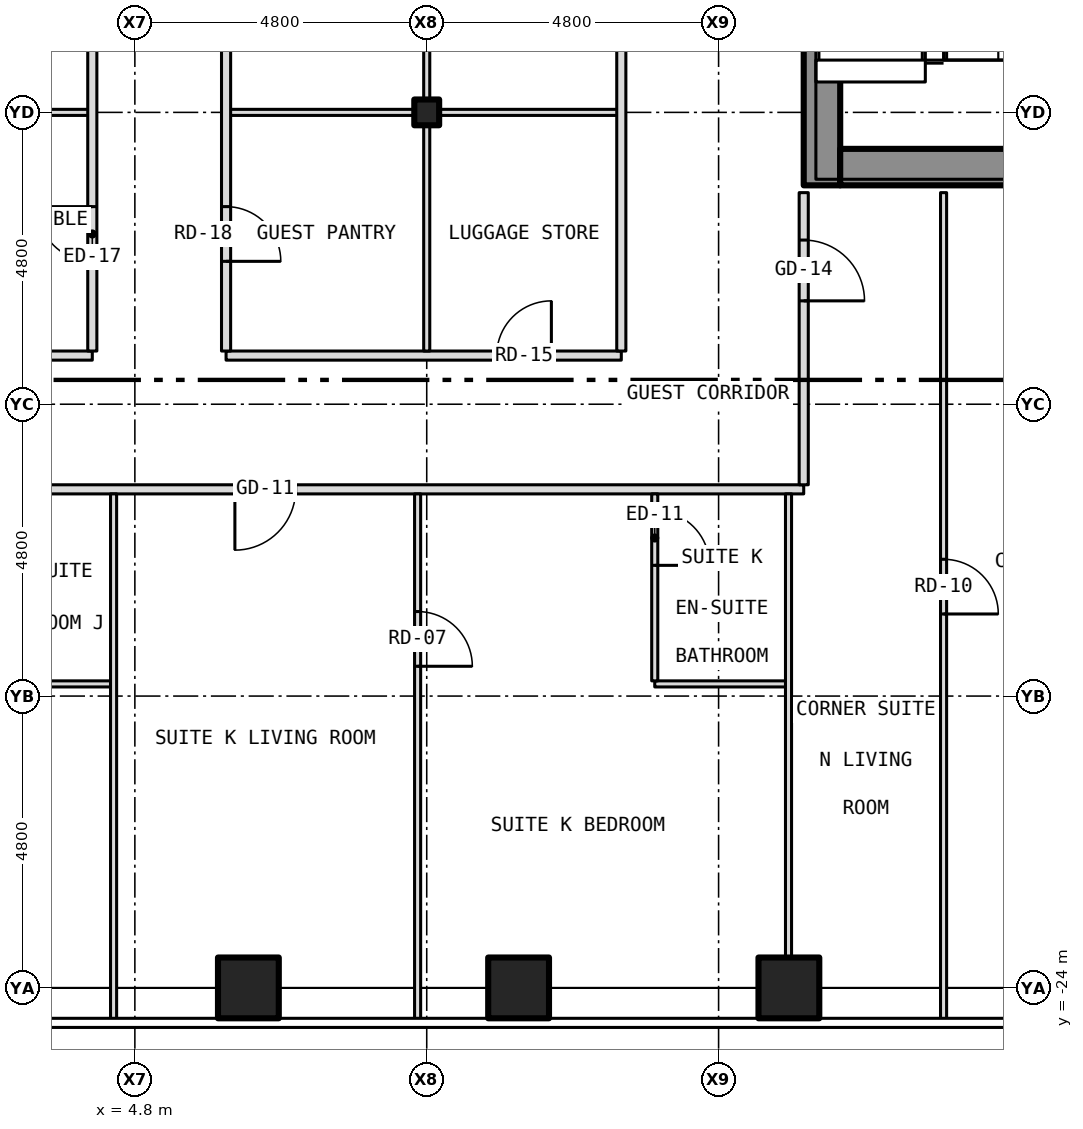
"""IFC4 building model, lengths in metres.
Left out: names, types, materials, properties, quantities, classifications, styles, units other than length and angle.
Written with IfcOpenShell. Run it as: python <this file> out.ifc"""

import sys

from ifc_helpers import new_model, si_unit, direction, frame, frame_2d, origin, origin_2d, place, context, subcontext, project, spatial, rectangle, hollow_rectangle, i_section, extrude, element, fill, save


model = new_model("IFC4")
c1 = context("Model", 3, precision=1e-05, world=origin(), true_north=direction((0.0, 1.0)))
c2 = subcontext(c1, "Body", "Model", "MODEL_VIEW")
j1 = project(units=[si_unit("LENGTHUNIT", "METRE"), si_unit("PLANEANGLEUNIT", "RADIAN")], contexts=[c1])
p1 = place(None, origin())
s1 = spatial("IfcSite", under=j1, at=p1, CompositionType="ELEMENT")
p2 = place(p1, origin())
s2 = spatial("IfcBuilding", under=s1, at=p2, CompositionType="ELEMENT")
p3 = place(p2, frame((0.0, 0.0, 49.5)))
s3 = spatial("IfcBuildingStorey", under=s2, at=p3, CompositionType="ELEMENT", Elevation=49.5)
for number, where, z_axis, x_axis in (
    (1, (6.667, -24.0, -0.15), (0.0, 0.0, 1.0), (1.0, 0.0, 0.0)),
    (2, (11.111, -24.0, -0.15), (0.0, 0.0, 1.0), (1.0, 0.0, 0.0)),
    (3, (15.556, -24.0, -0.15), (0.0, 0.0, 1.0), (1.0, 0.0, 0.0)),
):
    element("IfcColumn", number, at=place(p3, frame(where, z_axis=z_axis, x_axis=x_axis)), inside=s3, PredefinedType="COLUMN", context=c2, shape_type="SweptSolid", body=[
        extrude(hollow_rectangle(XDim=1.0, YDim=1.0, WallThickness=0.06, at=origin_2d()), origin(), (0.0, 0.0, 1.0), 3.5),
    ])
p4 = place(p3, frame((9.6, -9.6, -0.15), z_axis=(0.0, 0.0, 1.0), x_axis=(1.0, 0.0, 0.0)))
e4 = element("IfcColumn", 4, at=p4, inside=s3, PredefinedType="COLUMN", context=c2, shape_type="SweptSolid", body=[
    extrude(i_section(OverallWidth=0.409, OverallDepth=0.424, WebThickness=0.033, FlangeThickness=0.052, at=origin_2d()), origin(), (0.0, 0.0, 1.0), 3.5),
])
p5 = place(p3, frame((16.1, -10.8, 0.0), z_axis=(0.0, 0.0, 1.0), x_axis=(0.0, 1.0, 0.0)))
e5 = element("IfcWall", 5, at=p5, inside=s3, PredefinedType="SHEAR", context=c2, shape_type="SweptSolid", body=[
    extrude(rectangle(XDim=21.6, YDim=0.6, at=frame_2d((10.8, 0.0))), origin(), (0.0, 0.0, 1.0), 3.25),
])
p6 = place(p5, frame((9.4, 0.0, 0.0)))
e6 = element("IfcOpeningElement", 6, at=p6, cuts=e5, PredefinedType="OPENING", context=c2, shape_type="SweptSolid", body=[
    extrude(rectangle(XDim=1.1, YDim=2.1, at=frame_2d((0.55, 1.05))), frame((0.0, 0.312, 0.0), z_axis=(0.0, -1.0, 0.0), x_axis=(1.0, 0.0, 0.0)), (0.0, 0.0, 1.0), 0.624),
])
p7 = place(p5, frame((11.5, 0.0, 0.0)))
e7 = element("IfcOpeningElement", 7, at=p7, cuts=e5, PredefinedType="OPENING", context=c2, shape_type="SweptSolid", body=[
    extrude(rectangle(XDim=1.1, YDim=2.1, at=frame_2d((0.55, 1.05))), frame((0.0, 0.312, 0.0), z_axis=(0.0, -1.0, 0.0), x_axis=(1.0, 0.0, 0.0)), (0.0, 0.0, 1.0), 0.624),
])
p8 = place(p5, frame((13.6, 0.0, 0.0)))
e8 = element("IfcOpeningElement", 8, at=p8, cuts=e5, PredefinedType="OPENING", context=c2, shape_type="SweptSolid", body=[
    extrude(rectangle(XDim=1.1, YDim=2.1, at=frame_2d((0.55, 1.05))), frame((0.0, 0.312, 0.0), z_axis=(0.0, -1.0, 0.0), x_axis=(1.0, 0.0, 0.0)), (0.0, 0.0, 1.0), 0.624),
])
p9 = place(p5, frame((15.7, 0.0, 0.0)))
e9 = element("IfcOpeningElement", 9, at=p9, cuts=e5, PredefinedType="OPENING", context=c2, shape_type="SweptSolid", body=[
    extrude(rectangle(XDim=1.1, YDim=2.1, at=frame_2d((0.55, 1.05))), frame((0.0, 0.312, 0.0), z_axis=(0.0, -1.0, 0.0), x_axis=(1.0, 0.0, 0.0)), (0.0, 0.0, 1.0), 0.624),
])
p10 = place(p5, frame((17.8, 0.0, 0.0)))
e10 = element("IfcOpeningElement", 10, at=p10, cuts=e5, PredefinedType="OPENING", context=c2, shape_type="SweptSolid", body=[
    extrude(rectangle(XDim=1.1, YDim=2.1, at=frame_2d((0.55, 1.05))), frame((0.0, 0.312, 0.0), z_axis=(0.0, -1.0, 0.0), x_axis=(1.0, 0.0, 0.0)), (0.0, 0.0, 1.0), 0.624),
])
p11 = place(p5, frame((5.642, 0.0, 0.0)))
e11 = element("IfcOpeningElement", 11, at=p11, cuts=e5, PredefinedType="OPENING", context=c2, shape_type="SweptSolid", body=[
    extrude(rectangle(XDim=1.1, YDim=2.1, at=frame_2d((0.55, 1.05))), frame((0.0, 0.312, 0.0), z_axis=(0.0, -1.0, 0.0), x_axis=(1.0, 0.0, 0.0)), (0.0, 0.0, 1.0), 0.624),
])
p12 = place(p5, frame((7.5, 0.0, 0.0)))
e12 = element("IfcOpeningElement", 12, at=p12, cuts=e5, PredefinedType="OPENING", context=c2, shape_type="SweptSolid", body=[
    extrude(rectangle(XDim=1.1, YDim=2.1, at=frame_2d((0.55, 1.05))), frame((0.0, 0.312, 0.0), z_axis=(0.0, -1.0, 0.0), x_axis=(1.0, 0.0, 0.0)), (0.0, 0.0, 1.0), 0.624),
])
p13 = place(p3, frame((16.4, -10.5, 0.0), z_axis=(0.0, 0.0, 1.0), x_axis=(1.0, 0.0, 0.0)))
e13 = element("IfcWall", 13, at=p13, inside=s3, PredefinedType="SHEAR", context=c2, shape_type="SweptSolid", body=[
    extrude(rectangle(XDim=7.0, YDim=0.6, at=frame_2d((3.5, 0.0))), origin(), (0.0, 0.0, 1.0), 3.25),
])
for number, where, z_axis, x_axis in (
    (14, (2.25, -19.0, 0.0), (0.0, 0.0, 1.0), (1.0, 0.0, 0.0)),
    (15, (13.35, -19.0, 0.0), (0.0, 0.0, 1.0), (1.0, 0.0, 0.0)),
):
    element("IfcWall", number, at=place(p3, frame(where, z_axis=z_axis, x_axis=x_axis)), inside=s3, PredefinedType="PARTITIONING", context=c2, shape_type="SweptSolid", body=[
        extrude(rectangle(XDim=2.2, YDim=0.1, at=frame_2d((1.1, 0.0))), origin(), (0.0, 0.0, 1.0), 3.35),
    ])
p14 = place(p3, frame((-15.8, -15.8, 0.0), z_axis=(0.0, 0.0, 1.0), x_axis=(1.0, 0.0, 0.0)))
e16 = element("IfcWall", 16, at=p14, inside=s3, PredefinedType="PARTITIONING", context=c2, shape_type="SweptSolid", body=[
    extrude(rectangle(XDim=31.6, YDim=0.15, at=frame_2d((15.8, 0.0))), origin(), (0.0, 0.0, 1.0), 3.35),
])
p15 = place(p14, frame((3.067, 0.0, 0.0)))
e17 = element("IfcOpeningElement", 17, at=p15, cuts=e16, PredefinedType="OPENING", context=c2, shape_type="SweptSolid", body=[
    extrude(rectangle(XDim=1.0, YDim=2.1, at=frame_2d((0.5, 1.05))), frame((0.0, 0.087, 0.0), z_axis=(0.0, -1.0, 0.0), x_axis=(1.0, 0.0, 0.0)), (0.0, 0.0, 1.0), 0.174),
])
p16 = place(p14, frame((5.311, 0.0, 0.0)))
e18 = element("IfcOpeningElement", 18, at=p16, cuts=e16, PredefinedType="OPENING", context=c2, shape_type="SweptSolid", body=[
    extrude(rectangle(XDim=1.0, YDim=2.1, at=frame_2d((0.5, 1.05))), frame((0.0, 0.087, 0.0), z_axis=(0.0, -1.0, 0.0), x_axis=(1.0, 0.0, 0.0)), (0.0, 0.0, 1.0), 0.174),
])
p17 = place(p14, frame((9.756, 0.0, 0.0)))
e19 = element("IfcOpeningElement", 19, at=p17, cuts=e16, PredefinedType="OPENING", context=c2, shape_type="SweptSolid", body=[
    extrude(rectangle(XDim=1.0, YDim=2.1, at=frame_2d((0.5, 1.05))), frame((0.0, 0.087, 0.0), z_axis=(0.0, -1.0, 0.0), x_axis=(1.0, 0.0, 0.0)), (0.0, 0.0, 1.0), 0.174),
])
p18 = place(p14, frame((15.311, 0.0, 0.0)))
e20 = element("IfcOpeningElement", 20, at=p18, cuts=e16, PredefinedType="OPENING", context=c2, shape_type="SweptSolid", body=[
    extrude(rectangle(XDim=1.0, YDim=2.1, at=frame_2d((0.5, 1.05))), frame((0.0, 0.087, 0.0), z_axis=(0.0, -1.0, 0.0), x_axis=(1.0, 0.0, 0.0)), (0.0, 0.0, 1.0), 0.174),
])
p19 = place(p14, frame((22.245, 0.0, 0.0)))
e21 = element("IfcOpeningElement", 21, at=p19, cuts=e16, PredefinedType="OPENING", context=c2, shape_type="SweptSolid", body=[
    extrude(rectangle(XDim=1.0, YDim=2.1, at=frame_2d((0.5, 1.05))), frame((0.0, 0.087, 0.0), z_axis=(0.0, -1.0, 0.0), x_axis=(1.0, 0.0, 0.0)), (0.0, 0.0, 1.0), 0.174),
])
p20 = place(p3, frame((-12.8, -13.6, 0.0), z_axis=(0.0, 0.0, 1.0), x_axis=(1.0, 0.0, 0.0)))
e22 = element("IfcWall", 22, at=p20, inside=s3, PredefinedType="PARTITIONING", context=c2, shape_type="SweptSolid", body=[
    extrude(rectangle(XDim=16.9, YDim=0.15, at=frame_2d((8.45, 0.0))), origin(), (0.0, 0.0, 1.0), 3.35),
])
p21 = place(p20, frame((1.15, 0.0, 0.0)))
e23 = element("IfcOpeningElement", 23, at=p21, cuts=e22, PredefinedType="OPENING", context=c2, shape_type="SweptSolid", body=[
    extrude(rectangle(XDim=0.9, YDim=2.1, at=frame_2d((0.45, 1.05))), frame((0.0, 0.087, 0.0), z_axis=(0.0, -1.0, 0.0), x_axis=(1.0, 0.0, 0.0)), (0.0, 0.0, 1.0), 0.174),
])
p22 = place(p20, frame((13.375, 0.0, 0.0)))
e24 = element("IfcOpeningElement", 24, at=p22, cuts=e22, PredefinedType="OPENING", context=c2, shape_type="SweptSolid", body=[
    extrude(rectangle(XDim=0.9, YDim=2.1, at=frame_2d((0.45, 1.05))), frame((0.0, 0.087, 0.0), z_axis=(0.0, -1.0, 0.0), x_axis=(1.0, 0.0, 0.0)), (0.0, 0.0, 1.0), 0.174),
])
p23 = place(p20, frame((7.55, 0.0, 0.0)))
e25 = element("IfcOpeningElement", 25, at=p23, cuts=e22, PredefinedType="OPENING", context=c2, shape_type="SweptSolid", body=[
    extrude(rectangle(XDim=0.9, YDim=2.1, at=frame_2d((0.45, 1.05))), frame((0.0, 0.087, 0.0), z_axis=(0.0, -1.0, 0.0), x_axis=(1.0, 0.0, 0.0)), (0.0, 0.0, 1.0), 0.174),
])
p24 = place(p3, frame((6.3, -13.6, 0.0), z_axis=(0.0, 0.0, 1.0), x_axis=(1.0, 0.0, 0.0)))
e26 = element("IfcWall", 26, at=p24, inside=s3, PredefinedType="PARTITIONING", context=c2, shape_type="SweptSolid", body=[
    extrude(rectangle(XDim=6.5, YDim=0.15, at=frame_2d((3.25, 0.0))), origin(), (0.0, 0.0, 1.0), 3.35),
])
p25 = place(p24, frame((4.45, 0.0, 0.0)))
e27 = element("IfcOpeningElement", 27, at=p25, cuts=e26, PredefinedType="OPENING", context=c2, shape_type="SweptSolid", body=[
    extrude(rectangle(XDim=0.9, YDim=2.1, at=frame_2d((0.45, 1.05))), frame((0.0, 0.087, 0.0), z_axis=(0.0, -1.0, 0.0), x_axis=(1.0, 0.0, 0.0)), (0.0, 0.0, 1.0), 0.174),
])
p26 = place(p3, frame((0.204, -9.6, 0.0), z_axis=(0.0, 0.0, 1.0), x_axis=(1.0, 0.0, 0.0)))
e28 = element("IfcWall", 28, at=p26, inside=s3, PredefinedType="PARTITIONING", context=c2, shape_type="SweptSolid", body=[
    extrude(rectangle(XDim=3.896, YDim=0.1, at=frame_2d((1.948, 0.0))), origin(), (0.0, 0.0, 1.0), 2.728),
])
p27 = place(p3, frame((6.3, -9.6, 0.0), z_axis=(0.0, 0.0, 1.0), x_axis=(1.0, 0.0, 0.0)))
e29 = element("IfcWall", 29, at=p27, inside=s3, PredefinedType="PARTITIONING", context=c2, shape_type="SweptSolid", body=[
    extrude(rectangle(XDim=3.096, YDim=0.1, at=frame_2d((1.548, 0.0))), origin(), (0.0, 0.0, 1.0), 2.728),
])
p28 = place(p3, frame((9.396, -9.6, 0.0), z_axis=(0.0, 0.0, 1.0), x_axis=(1.0, 0.0, 0.0)))
e30 = element("IfcWall", 30, at=p28, inside=s3, PredefinedType="PARTITIONING", context=c2, shape_type="SweptSolid", body=[
    extrude(rectangle(XDim=0.408, YDim=0.1, at=frame_2d((0.204, 0.0))), origin(), (0.0, 0.0, 1.0), 3.35),
])
p29 = place(p3, frame((9.804, -9.6, 0.0), z_axis=(0.0, 0.0, 1.0), x_axis=(1.0, 0.0, 0.0)))
e31 = element("IfcWall", 31, at=p29, inside=s3, PredefinedType="PARTITIONING", context=c2, shape_type="SweptSolid", body=[
    extrude(rectangle(XDim=2.996, YDim=0.1, at=frame_2d((1.498, 0.0))), origin(), (0.0, 0.0, 1.0), 2.728),
])
p30 = place(p3, frame((4.1, -13.525, 0.0), z_axis=(0.0, 0.0, 1.0), x_axis=(0.0, 1.0, 0.0)))
e32 = element("IfcWall", 32, at=p30, inside=s3, PredefinedType="PARTITIONING", context=c2, shape_type="SweptSolid", body=[
    extrude(rectangle(XDim=17.55, YDim=0.15, at=frame_2d((8.775, 0.0))), origin(), (0.0, 0.0, 1.0), 3.35),
])
p31 = place(p30, frame((1.475, 0.0, 0.0)))
e33 = element("IfcOpeningElement", 33, at=p31, cuts=e32, PredefinedType="OPENING", context=c2, shape_type="SweptSolid", body=[
    extrude(rectangle(XDim=0.9, YDim=2.1, at=frame_2d((0.45, 1.05))), frame((0.0, 0.087, 0.0), z_axis=(0.0, -1.0, 0.0), x_axis=(1.0, 0.0, 0.0)), (0.0, 0.0, 1.0), 0.174),
])
p32 = place(p30, frame((8.275, 0.0, 0.0)))
e34 = element("IfcOpeningElement", 34, at=p32, cuts=e32, PredefinedType="OPENING", context=c2, shape_type="SweptSolid", body=[
    extrude(rectangle(XDim=0.9, YDim=2.1, at=frame_2d((0.45, 1.05))), frame((0.0, 0.087, 0.0), z_axis=(0.0, -1.0, 0.0), x_axis=(1.0, 0.0, 0.0)), (0.0, 0.0, 1.0), 0.174),
])
p33 = place(p3, frame((4.45, -24.53, 0.0), z_axis=(0.0, 0.0, 1.0), x_axis=(0.0, 1.0, 0.0)))
e35 = element("IfcWall", 35, at=p33, inside=s3, PredefinedType="PARTITIONING", context=c2, shape_type="SweptSolid", body=[
    extrude(rectangle(XDim=8.655, YDim=0.1, at=frame_2d((4.328, 0.0))), origin(), (0.0, 0.0, 1.0), 3.35),
])
p34 = place(p3, frame((6.3, -13.525, 0.0), z_axis=(0.0, 0.0, 1.0), x_axis=(0.0, 1.0, 0.0)))
e36 = element("IfcWall", 36, at=p34, inside=s3, PredefinedType="PARTITIONING", context=c2, shape_type="SweptSolid", body=[
    extrude(rectangle(XDim=17.55, YDim=0.15, at=frame_2d((8.775, 0.0))), origin(), (0.0, 0.0, 1.0), 3.35),
])
p35 = place(p34, frame((1.475, 0.0, 0.0)))
e37 = element("IfcOpeningElement", 37, at=p35, cuts=e36, PredefinedType="OPENING", context=c2, shape_type="SweptSolid", body=[
    extrude(rectangle(XDim=0.9, YDim=2.1, at=frame_2d((0.45, 1.05))), frame((0.0, 0.087, 0.0), z_axis=(0.0, -1.0, 0.0), x_axis=(1.0, 0.0, 0.0)), (0.0, 0.0, 1.0), 0.174),
])
p36 = place(p34, frame((15.125, 0.0, 0.0)))
e38 = element("IfcOpeningElement", 38, at=p36, cuts=e36, PredefinedType="OPENING", context=c2, shape_type="SweptSolid", body=[
    extrude(rectangle(XDim=0.9, YDim=2.1, at=frame_2d((0.45, 1.05))), frame((0.0, 0.087, 0.0), z_axis=(0.0, -1.0, 0.0), x_axis=(1.0, 0.0, 0.0)), (0.0, 0.0, 1.0), 0.174),
])
p37 = place(p34, frame((8.275, 0.0, 0.0)))
e39 = element("IfcOpeningElement", 39, at=p37, cuts=e36, PredefinedType="OPENING", context=c2, shape_type="SweptSolid", body=[
    extrude(rectangle(XDim=0.9, YDim=2.1, at=frame_2d((0.45, 1.05))), frame((0.0, 0.087, 0.0), z_axis=(0.0, -1.0, 0.0), x_axis=(1.0, 0.0, 0.0)), (0.0, 0.0, 1.0), 0.174),
])
p38 = place(p3, frame((9.45, -24.53, 0.0), z_axis=(0.0, 0.0, 1.0), x_axis=(0.0, 1.0, 0.0)))
e40 = element("IfcWall", 40, at=p38, inside=s3, PredefinedType="PARTITIONING", context=c2, shape_type="SweptSolid", body=[
    extrude(rectangle(XDim=8.655, YDim=0.1, at=frame_2d((4.328, 0.0))), origin(), (0.0, 0.0, 1.0), 2.728),
])
p39 = place(p38, frame((5.82, 0.0, 0.0)))
e41 = element("IfcOpeningElement", 41, at=p39, cuts=e40, PredefinedType="OPENING", context=c2, shape_type="SweptSolid", body=[
    extrude(rectangle(XDim=0.9, YDim=2.1, at=frame_2d((0.45, 1.05))), frame((0.0, 0.062, 0.0), z_axis=(0.0, -1.0, 0.0), x_axis=(1.0, 0.0, 0.0)), (0.0, 0.0, 1.0), 0.124),
])
p40 = place(p3, frame((9.6, -13.525, 0.0), z_axis=(0.0, 0.0, 1.0), x_axis=(0.0, 1.0, 0.0)))
e42 = element("IfcWall", 42, at=p40, inside=s3, PredefinedType="PARTITIONING", context=c2, shape_type="SweptSolid", body=[
    extrude(rectangle(XDim=3.875, YDim=0.1, at=frame_2d((1.938, 0.0))), origin(), (0.0, 0.0, 1.0), 2.728),
])
p41 = place(p3, frame((9.6, -9.55, 0.0), z_axis=(0.0, 0.0, 1.0), x_axis=(0.0, 1.0, 0.0)))
e43 = element("IfcWall", 43, at=p41, inside=s3, PredefinedType="PARTITIONING", context=c2, shape_type="SweptSolid", body=[
    extrude(rectangle(XDim=9.5, YDim=0.1, at=frame_2d((4.75, 0.0))), origin(), (0.0, 0.0, 1.0), 2.728),
])
p42 = place(p3, frame((12.8, -13.525, 0.0), z_axis=(0.0, 0.0, 1.0), x_axis=(0.0, 1.0, 0.0)))
e44 = element("IfcWall", 44, at=p42, inside=s3, PredefinedType="PARTITIONING", context=c2, shape_type="SweptSolid", body=[
    extrude(rectangle(XDim=11.525, YDim=0.15, at=frame_2d((5.762, 0.0))), origin(), (0.0, 0.0, 1.0), 3.35),
])
p43 = place(p42, frame((7.325, 0.0, 0.0)))
e45 = element("IfcOpeningElement", 45, at=p43, cuts=e44, PredefinedType="OPENING", context=c2, shape_type="SweptSolid", body=[
    extrude(rectangle(XDim=0.9, YDim=2.1, at=frame_2d((0.45, 1.05))), frame((0.0, 0.087, 0.0), z_axis=(0.0, -1.0, 0.0), x_axis=(1.0, 0.0, 0.0)), (0.0, 0.0, 1.0), 0.174),
])
p44 = place(p3, frame((13.35, -18.95, 0.0), z_axis=(0.0, 0.0, 1.0), x_axis=(0.0, 1.0, 0.0)))
e46 = element("IfcWall", 46, at=p44, inside=s3, PredefinedType="PARTITIONING", context=c2, shape_type="SweptSolid", body=[
    extrude(rectangle(XDim=3.075, YDim=0.1, at=frame_2d((1.538, 0.0))), origin(), (0.0, 0.0, 1.0), 3.35),
])
p45 = place(p44, frame((1.9, 0.0, 0.0)))
e47 = element("IfcOpeningElement", 47, at=p45, cuts=e46, PredefinedType="OPENING", context=c2, shape_type="SweptSolid", body=[
    extrude(rectangle(XDim=0.9, YDim=2.1, at=frame_2d((0.45, 1.05))), frame((0.0, 0.062, 0.0), z_axis=(0.0, -1.0, 0.0), x_axis=(1.0, 0.0, 0.0)), (0.0, 0.0, 1.0), 0.124),
])
p46 = place(p3, frame((15.55, -23.88, 0.0), z_axis=(0.0, 0.0, 1.0), x_axis=(0.0, 1.0, 0.0)))
e48 = element("IfcWall", 48, at=p46, inside=s3, PredefinedType="PARTITIONING", context=c2, shape_type="SweptSolid", body=[
    extrude(rectangle(XDim=8.005, YDim=0.1, at=frame_2d((4.002, 0.0))), origin(), (0.0, 0.0, 1.0), 3.35),
])
p47 = place(p3, frame((15.8, -15.725, 0.0), z_axis=(0.0, 0.0, 1.0), x_axis=(0.0, 1.0, 0.0)))
e49 = element("IfcWall", 49, at=p47, inside=s3, PredefinedType="PARTITIONING", context=c2, shape_type="SweptSolid", body=[
    extrude(rectangle(XDim=4.805, YDim=0.15, at=frame_2d((2.403, 0.0))), origin(), (0.0, 0.0, 1.0), 3.35),
])
p48 = place(p47, frame((3.025, 0.0, 0.0)))
e50 = element("IfcOpeningElement", 50, at=p48, cuts=e49, PredefinedType="OPENING", context=c2, shape_type="SweptSolid", body=[
    extrude(rectangle(XDim=1.0, YDim=2.1, at=frame_2d((0.5, 1.05))), frame((0.0, 0.087, 0.0), z_axis=(0.0, -1.0, 0.0), x_axis=(1.0, 0.0, 0.0)), (0.0, 0.0, 1.0), 0.174),
])
p49 = place(p3, frame((18.1, -24.53, 0.0), z_axis=(0.0, 0.0, 1.0), x_axis=(0.0, 1.0, 0.0)))
e51 = element("IfcWall", 51, at=p49, inside=s3, PredefinedType="PARTITIONING", context=c2, shape_type="SweptSolid", body=[
    extrude(rectangle(XDim=13.61, YDim=0.1, at=frame_2d((6.805, 0.0))), origin(), (0.0, 0.0, 1.0), 3.35),
])
p50 = place(p49, frame((6.68, 0.0, 0.0)))
e52 = element("IfcOpeningElement", 52, at=p50, cuts=e51, PredefinedType="OPENING", context=c2, shape_type="SweptSolid", body=[
    extrude(rectangle(XDim=0.9, YDim=2.1, at=frame_2d((0.45, 1.05))), frame((0.0, 0.062, 0.0), z_axis=(0.0, -1.0, 0.0), x_axis=(1.0, 0.0, 0.0)), (0.0, 0.0, 1.0), 0.124),
])
p51 = place(p19, origin())
e53 = element("IfcDoor", 53, at=p51, inside=s3, OperationType="SINGLE_SWING_LEFT", PredefinedType="DOOR", context=c2, shape_type="SweptSolid", body=[
    extrude(rectangle(XDim=1.0, YDim=2.1, at=frame_2d((0.5, 1.05))), frame((0.0, 0.025, 0.0), z_axis=(0.0, -1.0, 0.0), x_axis=(1.0, 0.0, 0.0)), (0.0, 0.0, 1.0), 0.05),
])
fill(e21, e53)
p52 = place(p39, origin())
e54 = element("IfcDoor", 54, at=p52, inside=s3, OperationType="SINGLE_SWING_LEFT", PredefinedType="DOOR", context=c2, shape_type="SweptSolid", body=[
    extrude(rectangle(XDim=0.9, YDim=2.1, at=frame_2d((0.45, 1.05))), frame((0.0, 0.025, 0.0), z_axis=(0.0, -1.0, 0.0), x_axis=(1.0, 0.0, 0.0)), (0.0, 0.0, 1.0), 0.05),
])
fill(e41, e54)
p53 = place(p45, origin())
e55 = element("IfcDoor", 55, at=p53, inside=s3, OperationType="SINGLE_SWING_LEFT", PredefinedType="DOOR", context=c2, shape_type="SweptSolid", body=[
    extrude(rectangle(XDim=0.9, YDim=2.1, at=frame_2d((0.45, 1.05))), frame((0.0, 0.025, 0.0), z_axis=(0.0, -1.0, 0.0), x_axis=(1.0, 0.0, 0.0)), (0.0, 0.0, 1.0), 0.05),
])
fill(e47, e55)
p54 = place(p48, origin())
e56 = element("IfcDoor", 56, at=p54, inside=s3, OperationType="SINGLE_SWING_LEFT", PredefinedType="DOOR", context=c2, shape_type="SweptSolid", body=[
    extrude(rectangle(XDim=1.0, YDim=2.1, at=frame_2d((0.5, 1.05))), frame((0.0, 0.025, 0.0), z_axis=(0.0, -1.0, 0.0), x_axis=(1.0, 0.0, 0.0)), (0.0, 0.0, 1.0), 0.05),
])
fill(e50, e56)
p55 = place(p50, origin())
e57 = element("IfcDoor", 57, at=p55, inside=s3, OperationType="SINGLE_SWING_LEFT", PredefinedType="DOOR", context=c2, shape_type="SweptSolid", body=[
    extrude(rectangle(XDim=0.9, YDim=2.1, at=frame_2d((0.45, 1.05))), frame((0.0, 0.025, 0.0), z_axis=(0.0, -1.0, 0.0), x_axis=(1.0, 0.0, 0.0)), (0.0, 0.0, 1.0), 0.05),
])
fill(e52, e57)
p56 = place(p25, origin())
e58 = element("IfcDoor", 58, at=p56, inside=s3, OperationType="SINGLE_SWING_RIGHT", PredefinedType="DOOR", context=c2, shape_type="SweptSolid", body=[
    extrude(rectangle(XDim=0.9, YDim=2.1, at=frame_2d((0.45, 1.05))), frame((0.0, 0.025, 0.0), z_axis=(0.0, -1.0, 0.0), x_axis=(1.0, 0.0, 0.0)), (0.0, 0.0, 1.0), 0.05),
])
fill(e27, e58)
p57 = place(p35, origin())
e59 = element("IfcDoor", 59, at=p57, inside=s3, OperationType="SINGLE_SWING_LEFT", PredefinedType="DOOR", context=c2, shape_type="SweptSolid", body=[
    extrude(rectangle(XDim=0.9, YDim=2.1, at=frame_2d((0.45, 1.05))), frame((0.0, 0.025, 0.0), z_axis=(0.0, -1.0, 0.0), x_axis=(1.0, 0.0, 0.0)), (0.0, 0.0, 1.0), 0.05),
])
fill(e37, e59)
p58 = place(p31, origin())
e60 = element("IfcDoor", 60, at=p58, inside=s3, OperationType="SINGLE_SWING_RIGHT", PredefinedType="DOOR", context=c2, shape_type="SweptSolid", body=[
    extrude(rectangle(XDim=0.9, YDim=2.1, at=frame_2d((0.45, 1.05))), frame((0.0, 0.025, 0.0), z_axis=(0.0, -1.0, 0.0), x_axis=(1.0, 0.0, 0.0)), (0.0, 0.0, 1.0), 0.05),
])
fill(e33, e60)
save(model, sys.argv[1])
